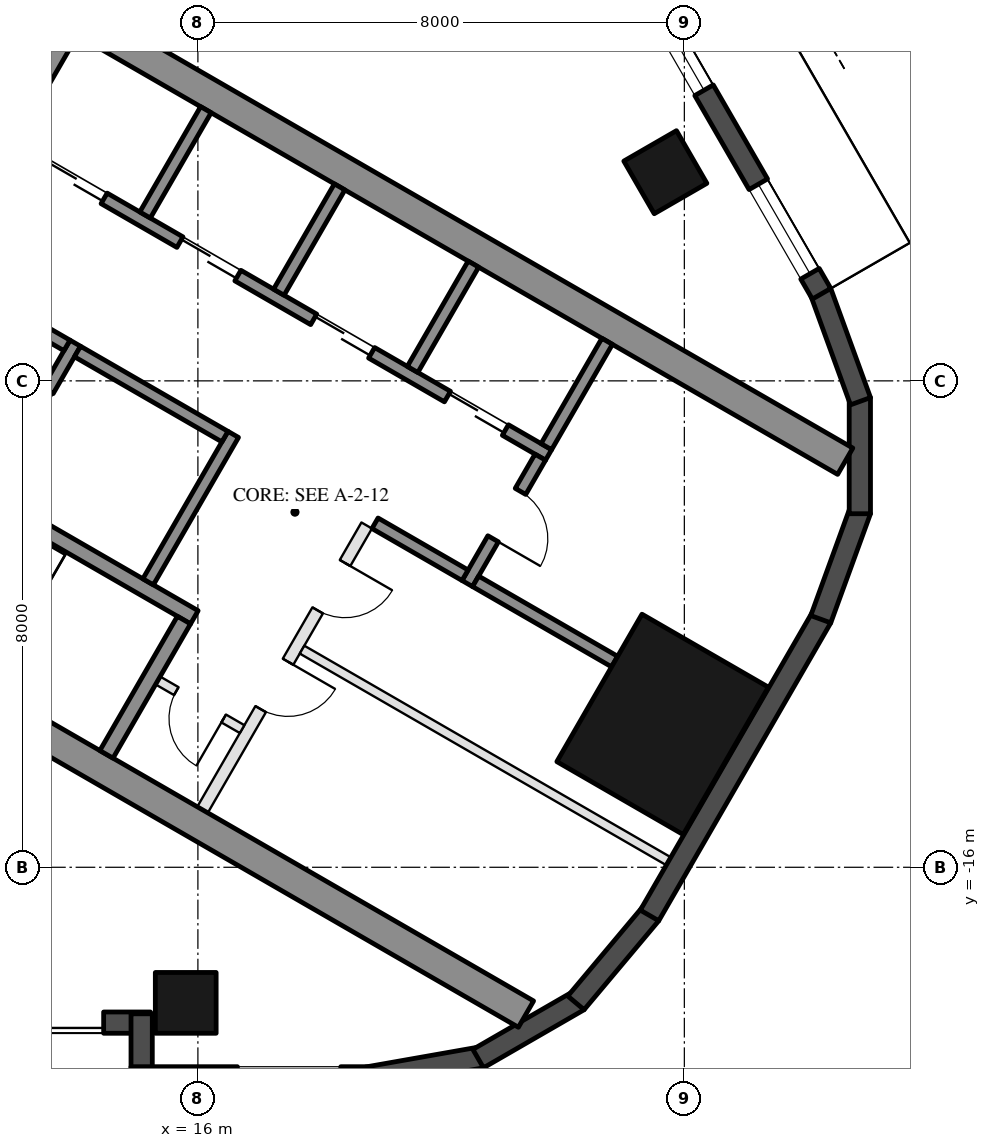
"""IFC4 building model, lengths in metres.
Left out: names, types, materials, properties, quantities, classifications, styles, units other than length and angle.
Written with IfcOpenShell. Run it as: python <this file> out.ifc"""

import sys

from ifc_helpers import new_model, si_unit, direction, frame, frame_2d, origin, origin_2d, place, context, subcontext, project, spatial, rectangle, hollow_rectangle, extrude, element, fill, save


model = new_model("IFC4")
c1 = context("Model", 3, precision=1e-05, world=origin(), true_north=direction((0.0, 1.0)))
c2 = subcontext(c1, "Body", "Model", "MODEL_VIEW")
j1 = project(units=[si_unit("LENGTHUNIT", "METRE"), si_unit("PLANEANGLEUNIT", "RADIAN")], contexts=[c1])
p1 = place(None, origin())
s1 = spatial("IfcSite", under=j1, at=p1, CompositionType="ELEMENT")
p2 = place(p1, origin())
s2 = spatial("IfcBuilding", under=s1, at=p2, CompositionType="ELEMENT")
p3 = place(p2, frame((0.0, 0.0, 57.6)))
s3 = spatial("IfcBuildingStorey", under=s2, at=p3, CompositionType="ELEMENT", Elevation=57.6)
for number, where, z_axis, x_axis in (
    (1, (15.8, -18.23, 0.0), (0.0, 0.0, 1.0), (-1.0, 0.0, 0.0)),
    (2, (23.688, -4.568, 0.0), (0.0, 0.0, 1.0), (-0.5, 0.866, 0.0)),
):
    element("IfcColumn", number, at=place(p3, frame(where, z_axis=z_axis, x_axis=x_axis)), inside=s3, PredefinedType="COLUMN", context=c2, shape_type="SweptSolid", body=[
        extrude(hollow_rectangle(XDim=1.0, YDim=1.0, WallThickness=0.045, at=origin_2d()), origin(), (0.0, 0.0, 1.0), 3.7),
    ])
p4 = place(p3, frame((23.643, -13.65, 0.0), z_axis=(0.0, 0.0, 1.0), x_axis=(0.5, 0.866025403784, 0.0)))
e3 = element("IfcColumn", 3, at=p4, inside=s3, PredefinedType="COLUMN", context=c2, shape_type="SweptSolid", body=[
    extrude(hollow_rectangle(XDim=2.8, YDim=2.4, WallThickness=0.07, at=origin_2d()), origin(), (0.0, 0.0, 1.0), 3.7),
])
p5 = place(p3, frame((8.48, -18.555, 0.0), z_axis=(0.0, 0.0, 1.0), x_axis=(1.0, 0.0, 0.0)))
e4 = element("IfcWall", 4, at=p5, inside=s3, PredefinedType="SOLIDWALL", context=c2, shape_type="SweptSolid", body=[
    extrude(rectangle(XDim=6.74, YDim=0.35, at=frame_2d((3.37, 0.0))), origin(), (0.0, 0.0, 1.0), 3.55),
])
p6 = place(p5, frame((3.57, 0.0, 0.0)))
e5 = element("IfcOpeningElement", 5, at=p6, cuts=e4, PredefinedType="OPENING", context=c2, shape_type="SweptSolid", body=[
    extrude(rectangle(XDim=2.4, YDim=2.4, at=frame_2d((1.2, 1.2))), frame((0.0, 0.185, 0.0), z_axis=(0.0, -1.0, 0.0), x_axis=(1.0, 0.0, 0.0)), (0.0, 0.0, 1.0), 0.37),
])
p7 = place(p5, frame((0.77, 0.0, 0.3)))
e6 = element("IfcOpeningElement", 6, at=p7, cuts=e4, PredefinedType="OPENING", context=c2, shape_type="SweptSolid", body=[
    extrude(rectangle(XDim=2.5, YDim=2.65, at=frame_2d((1.25, 1.325))), frame((0.0, 0.185, 0.0), z_axis=(0.0, -1.0, 0.0), x_axis=(1.0, 0.0, 0.0)), (0.0, 0.0, 1.0), 0.37),
])
p8 = place(p3, frame((15.075, -18.41, 0.0), z_axis=(0.0, 0.0, 1.0), x_axis=(0.0, -1.0, 0.0)))
e7 = element("IfcWall", 7, at=p8, inside=s3, PredefinedType="SOLIDWALL", context=c2, shape_type="SweptSolid", body=[
    extrude(rectangle(XDim=1.22, YDim=0.35, at=frame_2d((0.61, 0.0))), origin(), (0.0, 0.0, 1.0), 3.55),
])
p9 = place(p3, frame((14.9, -19.455, 0.0), z_axis=(0.0, 0.0, 1.0), x_axis=(1.0, 0.0, 0.0)))
e8 = element("IfcWall", 8, at=p9, inside=s3, PredefinedType="SOLIDWALL", context=c2, shape_type="SweptSolid", body=[
    extrude(rectangle(XDim=3.916, YDim=0.35, at=frame_2d((1.958, 0.0))), origin(), (0.0, 0.0, 1.0), 3.55),
])
p10 = place(p9, frame((1.75, 0.0, 0.3)))
e9 = element("IfcOpeningElement", 9, at=p10, cuts=e8, PredefinedType="OPENING", context=c2, shape_type="SweptSolid", body=[
    extrude(rectangle(XDim=1.7, YDim=2.65, at=frame_2d((0.85, 1.325))), frame((0.0, 0.185, 0.0), z_axis=(0.0, -1.0, 0.0), x_axis=(1.0, 0.0, 0.0)), (0.0, 0.0, 1.0), 0.37),
])
p11 = place(p3, frame((18.785, -19.458, 0.0), z_axis=(0.0, 0.0, 1.0), x_axis=(0.984798995425, 0.173697837091, 0.0)))
e10 = element("IfcWall", 10, at=p11, inside=s3, PredefinedType="SOLIDWALL", context=c2, shape_type="SweptSolid", body=[
    extrude(rectangle(XDim=1.91, YDim=0.35, at=frame_2d((0.955, 0.0))), origin(), (0.0, 0.0, 1.0), 3.55),
])
for number, where, z_axis, x_axis in (
    (11, (20.61, -19.147, 0.0), (0.0, 0.0, 1.0), (0.866, 0.5, 0.0)),
    (12, (22.217, -18.231, 0.0), (0.0, 0.0, 1.0), (0.643, 0.766, 0.0)),
):
    element("IfcWall", number, at=place(p3, frame(where, z_axis=z_axis, x_axis=x_axis)), inside=s3, PredefinedType="SOLIDWALL", context=c2, shape_type="SweptSolid", body=[
        extrude(rectangle(XDim=1.91, YDim=0.35, at=frame_2d((0.955, 0.0))), origin(), (0.0, 0.0, 1.0), 3.55),
    ])
p12 = place(p3, frame((23.427, -16.792, 0.0), z_axis=(0.0, 0.0, 1.0), x_axis=(0.500018773155, 0.866014564827, 0.0)))
e13 = element("IfcWall", 13, at=p12, inside=s3, PredefinedType="SOLIDWALL", context=c2, shape_type="SweptSolid", body=[
    extrude(rectangle(XDim=5.658, YDim=0.35, at=frame_2d((2.829, 0.0))), origin(), (0.0, 0.0, 1.0), 3.55),
])
for number, where, z_axis, x_axis in (
    (14, (26.244, -11.92, 0.0), (0.0, 0.0, 1.0), (0.342, 0.94, 0.0)),
    (15, (26.886, -10.185, 0.0), (0.0, 0.0, 1.0), (0.0, 1.0, 0.0)),
    (16, (26.897, -8.335, 0.0), (0.0, 0.0, 1.0), (-0.342, 0.94, 0.0)),
):
    element("IfcWall", number, at=place(p3, frame(where, z_axis=z_axis, x_axis=x_axis)), inside=s3, PredefinedType="SOLIDWALL", context=c2, shape_type="SweptSolid", body=[
        extrude(rectangle(XDim=1.91, YDim=0.35, at=frame_2d((0.955, 0.0))), origin(), (0.0, 0.0, 1.0), 3.55),
    ])
p13 = place(p3, frame((26.257, -6.567, 0.0), z_axis=(0.0, 0.0, 1.0), x_axis=(-0.500023526245, 0.866011820475, 0.0)))
e17 = element("IfcWall", 17, at=p13, inside=s3, PredefinedType="SOLIDWALL", context=c2, shape_type="SweptSolid", body=[
    extrude(rectangle(XDim=11.816, YDim=0.35, at=frame_2d((5.908, 0.0))), origin(), (0.0, 0.0, 1.0), 3.55),
])
p14 = place(p13, frame((0.38, 0.0, 0.3)))
e18 = element("IfcOpeningElement", 18, at=p14, cuts=e17, PredefinedType="OPENING", context=c2, shape_type="SweptSolid", body=[
    extrude(rectangle(XDim=1.7, YDim=2.65, at=frame_2d((0.85, 1.325))), frame((0.0, 0.185, 0.0), z_axis=(0.0, -1.0, 0.0), x_axis=(1.0, 0.0, 0.0)), (0.0, 0.0, 1.0), 0.37),
])
p15 = place(p13, frame((7.666, 0.0, 0.0)))
e19 = element("IfcOpeningElement", 19, at=p15, cuts=e17, PredefinedType="OPENING", context=c2, shape_type="SweptSolid", body=[
    extrude(rectangle(XDim=2.4, YDim=2.4, at=frame_2d((1.2, 1.2))), frame((0.0, 0.185, 0.0), z_axis=(0.0, -1.0, 0.0), x_axis=(1.0, 0.0, 0.0)), (0.0, 0.0, 1.0), 0.37),
])
p16 = place(p13, frame((3.865, 0.0, 0.3)))
e20 = element("IfcOpeningElement", 20, at=p16, cuts=e17, PredefinedType="OPENING", context=c2, shape_type="SweptSolid", body=[
    extrude(rectangle(XDim=1.6, YDim=2.65, at=frame_2d((0.8, 1.325))), frame((0.0, 0.185, 0.0), z_axis=(0.0, -1.0, 0.0), x_axis=(1.0, 0.0, 0.0)), (0.0, 0.0, 1.0), 0.37),
])
p17 = place(p13, frame((5.765, 0.0, 0.3)))
e21 = element("IfcOpeningElement", 21, at=p17, cuts=e17, PredefinedType="OPENING", context=c2, shape_type="SweptSolid", body=[
    extrude(rectangle(XDim=1.6, YDim=2.65, at=frame_2d((0.8, 1.325))), frame((0.0, 0.185, 0.0), z_axis=(0.0, -1.0, 0.0), x_axis=(1.0, 0.0, 0.0)), (0.0, 0.0, 1.0), 0.37),
])
for number, where, z_axis, x_axis in (
    (22, (8.547, -10.997, 0.0), (0.0, 0.0, 1.0), (0.866, -0.5, 0.0)),
    (23, (13.797, -1.903, 0.0), (0.0, 0.0, 1.0), (0.866, -0.5, 0.0)),
):
    element("IfcWall", number, at=place(p3, frame(where, z_axis=z_axis, x_axis=x_axis)), inside=s3, PredefinedType="SHEAR", context=c2, shape_type="SweptSolid", body=[
        extrude(rectangle(XDim=14.837, YDim=0.5, at=frame_2d((7.418, 0.0))), origin(), (0.0, 0.0, 1.0), 3.5),
    ])
p18 = place(p3, frame((8.845, -10.88, 0.0), z_axis=(0.0, 0.0, 1.0), x_axis=(0.500004234368, 0.866022959057, 0.0)))
e24 = element("IfcWall", 24, at=p18, inside=s3, PredefinedType="SHEAR", context=c2, shape_type="SweptSolid", body=[
    extrude(rectangle(XDim=10.0, YDim=0.4, at=frame_2d((5.0, 0.0))), origin(), (0.0, 0.0, 1.0), 3.5),
])
p19 = place(p18, frame((3.55, 0.0, 0.0)))
e25 = element("IfcOpeningElement", 25, at=p19, cuts=e24, PredefinedType="OPENING", context=c2, shape_type="SweptSolid", body=[
    extrude(rectangle(XDim=1.1, YDim=2.1, at=frame_2d((0.55, 1.05))), frame((0.0, 0.21, 0.0), z_axis=(0.0, -1.0, 0.0), x_axis=(1.0, 0.0, 0.0)), (0.0, 0.0, 1.0), 0.42),
])
p20 = place(p18, frame((5.85, 0.0, 0.0)))
e26 = element("IfcOpeningElement", 26, at=p20, cuts=e24, PredefinedType="OPENING", context=c2, shape_type="SweptSolid", body=[
    extrude(rectangle(XDim=1.4, YDim=2.1, at=frame_2d((0.7, 1.05))), frame((0.0, 0.21, 0.0), z_axis=(0.0, -1.0, 0.0), x_axis=(1.0, 0.0, 0.0)), (0.0, 0.0, 1.0), 0.42),
])
p21 = place(p3, frame((10.356, -8.664, 0.0), z_axis=(0.0, 0.0, 1.0), x_axis=(0.866028629588, -0.499994412703, 0.0)))
e27 = element("IfcWall", 27, at=p21, inside=s3, PredefinedType="SHEAR", context=c2, shape_type="SweptSolid", body=[
    extrude(rectangle(XDim=6.45, YDim=0.25, at=frame_2d((3.225, 0.0))), origin(), (0.0, 0.0, 1.0), 3.5),
])
p22 = place(p21, frame((0.3, 0.0, 0.0)))
e28 = element("IfcOpeningElement", 28, at=p22, cuts=e27, PredefinedType="OPENING", context=c2, shape_type="SweptSolid", body=[
    extrude(rectangle(XDim=1.0, YDim=2.1, at=frame_2d((0.5, 1.05))), frame((0.0, 0.135, 0.0), z_axis=(0.0, -1.0, 0.0), x_axis=(1.0, 0.0, 0.0)), (0.0, 0.0, 1.0), 0.27),
])
p23 = place(p3, frame((14.496, -14.143, 0.0), z_axis=(0.0, 0.0, 1.0), x_axis=(0.500062241894, 0.865989465428, 0.0)))
e29 = element("IfcWall", 29, at=p23, inside=s3, PredefinedType="SHEAR", context=c2, shape_type="SweptSolid", body=[
    extrude(rectangle(XDim=2.55, YDim=0.25, at=frame_2d((1.275, 0.0))), origin(), (0.0, 0.0, 1.0), 3.5),
])
p24 = place(p3, frame((15.181, -11.305, 0.0), z_axis=(0.0, 0.0, 1.0), x_axis=(0.49994636267, 0.866056369097, 0.0)))
e30 = element("IfcWall", 30, at=p24, inside=s3, PredefinedType="SHEAR", context=c2, shape_type="SweptSolid", body=[
    extrude(rectangle(XDim=2.8, YDim=0.2, at=frame_2d((1.4, 0.0))), origin(), (0.0, 0.0, 1.0), 3.5),
])
p25 = place(p3, frame((12.583, -9.805, 0.0), z_axis=(0.0, 0.0, 1.0), x_axis=(0.49994636267, 0.866056369097, 0.0)))
e31 = element("IfcWall", 31, at=p25, inside=s3, PredefinedType="SHEAR", context=c2, shape_type="SweptSolid", body=[
    extrude(rectangle(XDim=2.8, YDim=0.2, at=frame_2d((1.4, 0.0))), origin(), (0.0, 0.0, 1.0), 3.5),
])
p26 = place(p25, frame((0.7, 0.0, 0.0)))
e32 = element("IfcOpeningElement", 32, at=p26, cuts=e31, PredefinedType="OPENING", context=c2, shape_type="SweptSolid", body=[
    extrude(rectangle(XDim=1.2, YDim=2.1, at=frame_2d((0.6, 1.05))), frame((0.0, 0.11, 0.0), z_axis=(0.0, -1.0, 0.0), x_axis=(1.0, 0.0, 0.0)), (0.0, 0.0, 1.0), 0.22),
])
p27 = place(p3, frame((11.768, -6.217, 0.0), z_axis=(0.0, 0.0, 1.0), x_axis=(0.866050077142, -0.499957262057, 0.0)))
e33 = element("IfcWall", 33, at=p27, inside=s3, PredefinedType="SHEAR", context=c2, shape_type="SweptSolid", body=[
    extrude(rectangle(XDim=2.4, YDim=0.2, at=frame_2d((1.2, 0.0))), origin(), (0.0, 0.0, 1.0), 3.5),
])
p28 = place(p3, frame((14.02, -7.517, 0.0), z_axis=(0.0, 0.0, 1.0), x_axis=(0.866034573852, -0.49998411664, 0.0)))
e34 = element("IfcWall", 34, at=p28, inside=s3, PredefinedType="SHEAR", context=c2, shape_type="SweptSolid", body=[
    extrude(rectangle(XDim=2.8, YDim=0.2, at=frame_2d((1.4, 0.0))), origin(), (0.0, 0.0, 1.0), 3.5),
])
p29 = place(p3, frame((12.968, -4.138, 0.0), z_axis=(0.0, 0.0, 1.0), x_axis=(0.866028328073, -0.49999493495, 0.0)))
e35 = element("IfcWall", 35, at=p29, inside=s3, PredefinedType="SHEAR", context=c2, shape_type="SweptSolid", body=[
    extrude(rectangle(XDim=10.16, YDim=0.2, at=frame_2d((5.08, 0.0))), origin(), (0.0, 0.0, 1.0), 3.5),
])
p30 = place(p29, frame((0.62, 0.0, 0.0)))
e36 = element("IfcOpeningElement", 36, at=p30, cuts=e35, PredefinedType="OPENING", context=c2, shape_type="SweptSolid", body=[
    extrude(rectangle(XDim=1.1, YDim=2.1, at=frame_2d((0.55, 1.05))), frame((0.0, 0.11, 0.0), z_axis=(0.0, -1.0, 0.0), x_axis=(1.0, 0.0, 0.0)), (0.0, 0.0, 1.0), 0.22),
])
p31 = place(p29, frame((3.16, 0.0, 0.0)))
e37 = element("IfcOpeningElement", 37, at=p31, cuts=e35, PredefinedType="OPENING", context=c2, shape_type="SweptSolid", body=[
    extrude(rectangle(XDim=1.1, YDim=2.1, at=frame_2d((0.55, 1.05))), frame((0.0, 0.11, 0.0), z_axis=(0.0, -1.0, 0.0), x_axis=(1.0, 0.0, 0.0)), (0.0, 0.0, 1.0), 0.22),
])
p32 = place(p29, frame((5.7, 0.0, 0.0)))
e38 = element("IfcOpeningElement", 38, at=p32, cuts=e35, PredefinedType="OPENING", context=c2, shape_type="SweptSolid", body=[
    extrude(rectangle(XDim=1.1, YDim=2.1, at=frame_2d((0.55, 1.05))), frame((0.0, 0.11, 0.0), z_axis=(0.0, -1.0, 0.0), x_axis=(1.0, 0.0, 0.0)), (0.0, 0.0, 1.0), 0.22),
])
p33 = place(p29, frame((8.24, 0.0, 0.0)))
e39 = element("IfcOpeningElement", 39, at=p33, cuts=e35, PredefinedType="OPENING", context=c2, shape_type="SweptSolid", body=[
    extrude(rectangle(XDim=1.1, YDim=2.1, at=frame_2d((0.55, 1.05))), frame((0.0, 0.11, 0.0), z_axis=(0.0, -1.0, 0.0), x_axis=(1.0, 0.0, 0.0)), (0.0, 0.0, 1.0), 0.22),
])
p34 = place(p3, frame((20.43, -11.333, 0.0), z_axis=(0.0, 0.0, 1.0), x_axis=(0.500001309137, 0.866024647952, 0.0)))
e40 = element("IfcWall", 40, at=p34, inside=s3, PredefinedType="SHEAR", context=c2, shape_type="SweptSolid", body=[
    extrude(rectangle(XDim=2.4, YDim=0.2, at=frame_2d((1.2, 0.0))), origin(), (0.0, 0.0, 1.0), 3.5),
])
p35 = place(p34, frame((0.85, 0.0, 0.0)))
e41 = element("IfcOpeningElement", 41, at=p35, cuts=e40, PredefinedType="OPENING", context=c2, shape_type="SweptSolid", body=[
    extrude(rectangle(XDim=0.9, YDim=2.1, at=frame_2d((0.45, 1.05))), frame((0.0, 0.11, 0.0), z_axis=(0.0, -1.0, 0.0), x_axis=(1.0, 0.0, 0.0)), (0.0, 0.0, 1.0), 0.22),
])
p36 = place(p3, frame((18.913, -10.342, 0.0), z_axis=(0.0, 0.0, 1.0), x_axis=(0.866038183914, -0.499977863513, 0.0)))
e42 = element("IfcWall", 42, at=p36, inside=s3, PredefinedType="SHEAR", context=c2, shape_type="SweptSolid", body=[
    extrude(rectangle(XDim=1.71, YDim=0.2, at=frame_2d((0.855, 0.0))), origin(), (0.0, 0.0, 1.0), 3.5),
])
for number, where, z_axis, x_axis in (
    (43, (15.131, -5.272, 0.0), (0.0, 0.0, 1.0), (0.5, 0.866, 0.0)),
    (44, (17.331, -6.542, 0.0), (0.0, 0.0, 1.0), (0.5, 0.866, 0.0)),
    (45, (19.531, -7.812, 0.0), (0.0, 0.0, 1.0), (0.5, 0.866, 0.0)),
    (46, (21.73, -9.082, 0.0), (0.0, 0.0, 1.0), (0.5, 0.866, 0.0)),
):
    element("IfcWall", number, at=place(p3, frame(where, z_axis=z_axis, x_axis=x_axis)), inside=s3, PredefinedType="SHEAR", context=c2, shape_type="SweptSolid", body=[
        extrude(rectangle(XDim=2.0, YDim=0.2, at=frame_2d((1.0, 0.0))), origin(), (0.0, 0.0, 1.0), 3.5),
    ])
p37 = place(p3, frame((20.567, -11.297, 0.0), z_axis=(0.0, 0.0, 1.0), x_axis=(0.866060851709, -0.499938597367, 0.0)))
e47 = element("IfcWall", 47, at=p37, inside=s3, PredefinedType="SHEAR", context=c2, shape_type="SweptSolid", body=[
    extrude(rectangle(XDim=2.64, YDim=0.2, at=frame_2d((1.32, 0.0))), origin(), (0.0, 0.0, 1.0), 3.5),
])
p38 = place(p3, frame((16.076, -15.055, 0.0), z_axis=(0.0, 0.0, 1.0), x_axis=(0.499995103361, 0.866028230842, 0.0)))
e48 = element("IfcWall", 48, at=p38, inside=s3, PredefinedType="PARTITIONING", context=c2, shape_type="SweptSolid", body=[
    extrude(rectangle(XDim=5.4, YDim=0.2, at=frame_2d((2.7, 0.0))), origin(), (0.0, 0.0, 1.0), 3.5),
])
p39 = place(p38, frame((1.913, 0.0, 0.0)))
e49 = element("IfcOpeningElement", 49, at=p39, cuts=e48, PredefinedType="OPENING", context=c2, shape_type="SweptSolid", body=[
    extrude(rectangle(XDim=0.9, YDim=2.1, at=frame_2d((0.45, 1.05))), frame((0.0, 0.11, 0.0), z_axis=(0.0, -1.0, 0.0), x_axis=(1.0, 0.0, 0.0)), (0.0, 0.0, 1.0), 0.22),
])
p40 = place(p38, frame((3.788, 0.0, 0.0)))
e50 = element("IfcOpeningElement", 50, at=p40, cuts=e48, PredefinedType="OPENING", context=c2, shape_type="SweptSolid", body=[
    extrude(rectangle(XDim=0.9, YDim=2.1, at=frame_2d((0.45, 1.05))), frame((0.0, 0.11, 0.0), z_axis=(0.0, -1.0, 0.0), x_axis=(1.0, 0.0, 0.0)), (0.0, 0.0, 1.0), 0.22),
])
p41 = place(p3, frame((15.342, -12.928, 0.0), z_axis=(0.0, 0.0, 1.0), x_axis=(0.865989903783, -0.500061482766, 0.0)))
e51 = element("IfcWall", 51, at=p41, inside=s3, PredefinedType="PARTITIONING", context=c2, shape_type="SweptSolid", body=[
    extrude(rectangle(XDim=1.6, YDim=0.15, at=frame_2d((0.8, 0.0))), origin(), (0.0, 0.0, 1.0), 3.5),
])
p42 = place(p41, frame((0.35, 0.0, 0.0)))
e52 = element("IfcOpeningElement", 52, at=p42, cuts=e51, PredefinedType="OPENING", context=c2, shape_type="SweptSolid", body=[
    extrude(rectangle(XDim=0.9, YDim=2.1, at=frame_2d((0.45, 1.05))), frame((0.0, 0.085, 0.0), z_axis=(0.0, -1.0, 0.0), x_axis=(1.0, 0.0, 0.0)), (0.0, 0.0, 1.0), 0.17),
])
p43 = place(p3, frame((17.713, -12.42, 0.0), z_axis=(0.0, 0.0, 1.0), x_axis=(0.866016523273, -0.500015381182, 0.0)))
e53 = element("IfcWall", 53, at=p43, inside=s3, PredefinedType="PARTITIONING", context=c2, shape_type="SweptSolid", body=[
    extrude(rectangle(XDim=6.95, YDim=0.15, at=frame_2d((3.475, 0.0))), origin(), (0.0, 0.0, 1.0), 3.5),
])
p44 = place(p6, frame((2.4, 0.0, 0.0), z_axis=(0.0, 0.0, 1.0), x_axis=(-1.0, 0.0, 0.0)))
e54 = element("IfcDoor", 54, at=p44, inside=s3, OperationType="SLIDING_TO_LEFT", PredefinedType="DOOR", context=c2, shape_type="SweptSolid", body=[
    extrude(rectangle(XDim=2.4, YDim=2.4, at=frame_2d((1.2, 1.2))), frame((0.0, 0.025, 0.0), z_axis=(0.0, -1.0, 0.0), x_axis=(1.0, 0.0, 0.0)), (0.0, 0.0, 1.0), 0.05),
])
fill(e5, e54)
p45 = place(p14, origin())
e55 = element("IfcWindow", 55, at=p45, inside=s3, PartitioningType="SINGLE_PANEL", PredefinedType="WINDOW", context=c2, shape_type="SweptSolid", body=[
    extrude(rectangle(XDim=1.7, YDim=2.65, at=frame_2d((0.85, 1.325))), frame((0.0, 0.03, 0.0), z_axis=(0.0, -1.0, 0.0), x_axis=(1.0, 0.0, 0.0)), (0.0, 0.0, 1.0), 0.06),
])
fill(e18, e55)
p46 = place(p16, origin())
e56 = element("IfcWindow", 56, at=p46, inside=s3, PartitioningType="SINGLE_PANEL", PredefinedType="WINDOW", context=c2, shape_type="SweptSolid", body=[
    extrude(rectangle(XDim=1.6, YDim=2.65, at=frame_2d((0.8, 1.325))), frame((0.0, 0.03, 0.0), z_axis=(0.0, -1.0, 0.0), x_axis=(1.0, 0.0, 0.0)), (0.0, 0.0, 1.0), 0.06),
])
fill(e20, e56)
p47 = place(p42, frame((0.9, 0.0, 0.0), z_axis=(0.0, 0.0, 1.0), x_axis=(-1.0, 0.0, 0.0)))
e57 = element("IfcDoor", 57, at=p47, inside=s3, OperationType="SINGLE_SWING_LEFT", PredefinedType="DOOR", context=c2, shape_type="SweptSolid", body=[
    extrude(rectangle(XDim=0.9, YDim=2.1, at=frame_2d((0.45, 1.05))), frame((0.0, 0.025, 0.0), z_axis=(0.0, -1.0, 0.0), x_axis=(1.0, 0.0, 0.0)), (0.0, 0.0, 1.0), 0.05),
])
fill(e52, e57)
p48 = place(p30, origin())
e58 = element("IfcDoor", 58, at=p48, inside=s3, OperationType="DOUBLE_DOOR_SLIDING", PredefinedType="DOOR", context=c2, shape_type="SweptSolid", body=[
    extrude(rectangle(XDim=1.1, YDim=2.1, at=frame_2d((0.55, 1.05))), frame((0.0, 0.025, 0.0), z_axis=(0.0, -1.0, 0.0), x_axis=(1.0, 0.0, 0.0)), (0.0, 0.0, 1.0), 0.05),
])
fill(e36, e58)
p49 = place(p31, origin())
e59 = element("IfcDoor", 59, at=p49, inside=s3, OperationType="DOUBLE_DOOR_SLIDING", PredefinedType="DOOR", context=c2, shape_type="SweptSolid", body=[
    extrude(rectangle(XDim=1.1, YDim=2.1, at=frame_2d((0.55, 1.05))), frame((0.0, 0.025, 0.0), z_axis=(0.0, -1.0, 0.0), x_axis=(1.0, 0.0, 0.0)), (0.0, 0.0, 1.0), 0.05),
])
fill(e37, e59)
p50 = place(p32, origin())
e60 = element("IfcDoor", 60, at=p50, inside=s3, OperationType="DOUBLE_DOOR_SLIDING", PredefinedType="DOOR", context=c2, shape_type="SweptSolid", body=[
    extrude(rectangle(XDim=1.1, YDim=2.1, at=frame_2d((0.55, 1.05))), frame((0.0, 0.025, 0.0), z_axis=(0.0, -1.0, 0.0), x_axis=(1.0, 0.0, 0.0)), (0.0, 0.0, 1.0), 0.05),
])
fill(e38, e60)
p51 = place(p33, origin())
e61 = element("IfcDoor", 61, at=p51, inside=s3, OperationType="DOUBLE_DOOR_SLIDING", PredefinedType="DOOR", context=c2, shape_type="SweptSolid", body=[
    extrude(rectangle(XDim=1.1, YDim=2.1, at=frame_2d((0.55, 1.05))), frame((0.0, 0.025, 0.0), z_axis=(0.0, -1.0, 0.0), x_axis=(1.0, 0.0, 0.0)), (0.0, 0.0, 1.0), 0.05),
])
fill(e39, e61)
p52 = place(p35, frame((0.9, 0.0, 0.0), z_axis=(0.0, 0.0, 1.0), x_axis=(-1.0, 0.0, 0.0)))
e62 = element("IfcDoor", 62, at=p52, inside=s3, OperationType="SINGLE_SWING_RIGHT", PredefinedType="DOOR", context=c2, shape_type="SweptSolid", body=[
    extrude(rectangle(XDim=0.9, YDim=2.1, at=frame_2d((0.45, 1.05))), frame((0.0, 0.025, 0.0), z_axis=(0.0, -1.0, 0.0), x_axis=(1.0, 0.0, 0.0)), (0.0, 0.0, 1.0), 0.05),
])
fill(e41, e62)
p53 = place(p39, frame((0.9, 0.0, 0.0), z_axis=(0.0, 0.0, 1.0), x_axis=(-1.0, 0.0, 0.0)))
e63 = element("IfcDoor", 63, at=p53, inside=s3, OperationType="SINGLE_SWING_LEFT", PredefinedType="DOOR", context=c2, shape_type="SweptSolid", body=[
    extrude(rectangle(XDim=0.9, YDim=2.1, at=frame_2d((0.45, 1.05))), frame((0.0, 0.025, 0.0), z_axis=(0.0, -1.0, 0.0), x_axis=(1.0, 0.0, 0.0)), (0.0, 0.0, 1.0), 0.05),
])
fill(e49, e63)
p54 = place(p40, frame((0.9, 0.0, 0.0), z_axis=(0.0, 0.0, 1.0), x_axis=(-1.0, 0.0, 0.0)))
e64 = element("IfcDoor", 64, at=p54, inside=s3, OperationType="SINGLE_SWING_LEFT", PredefinedType="DOOR", context=c2, shape_type="SweptSolid", body=[
    extrude(rectangle(XDim=0.9, YDim=2.1, at=frame_2d((0.45, 1.05))), frame((0.0, 0.025, 0.0), z_axis=(0.0, -1.0, 0.0), x_axis=(1.0, 0.0, 0.0)), (0.0, 0.0, 1.0), 0.05),
])
fill(e50, e64)
save(model, sys.argv[1])
